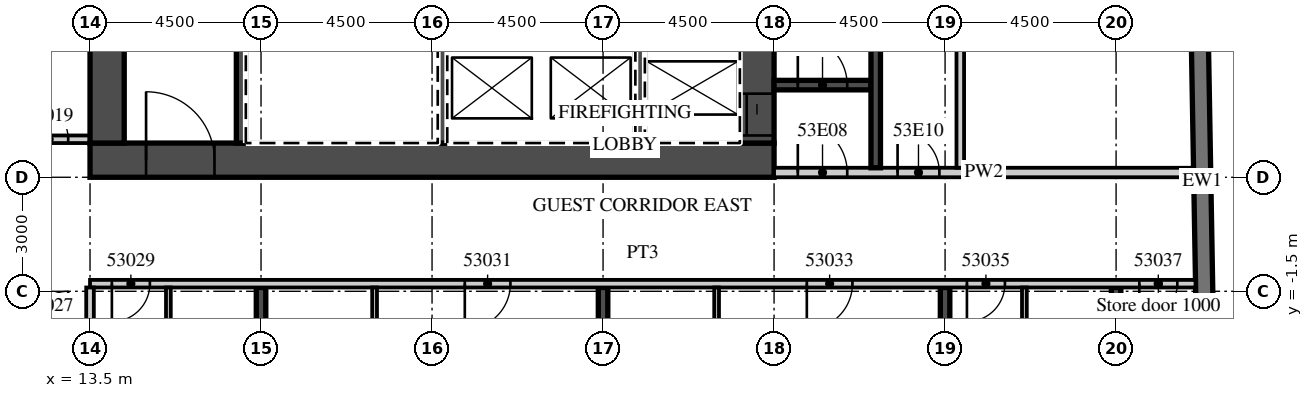
"""IFC4 building model, lengths in metres.
Left out: names, types, materials, properties, quantities, classifications, styles, units other than length and angle.
Written with IfcOpenShell. Run it as: python <this file> out.ifc"""

import sys

from ifc_helpers import new_model, si_unit, direction, frame, frame_2d, origin, place, context, subcontext, project, spatial, rectangle, extrude, element, fill, save


model = new_model("IFC4")
c1 = context("Model", 3, precision=1e-05, world=origin(), true_north=direction((0.0, 1.0)))
c2 = subcontext(c1, "Body", "Model", "MODEL_VIEW")
j1 = project(units=[si_unit("LENGTHUNIT", "METRE"), si_unit("PLANEANGLEUNIT", "RADIAN")], contexts=[c1])
p1 = place(None, origin())
s1 = spatial("IfcSite", under=j1, at=p1, CompositionType="ELEMENT")
p2 = place(p1, origin())
s2 = spatial("IfcBuilding", under=s1, at=p2, CompositionType="ELEMENT")
p3 = place(p2, frame((0.0, 0.0, 221.0)))
s3 = spatial("IfcBuildingStorey", under=s2, at=p3, CompositionType="ELEMENT", Elevation=221.0)
p4 = place(p3, frame((18.0, -19.079, 0.0), z_axis=(0.0, 0.0, 1.0), x_axis=(0.0, 1.0, 0.0)))
e1 = element("IfcWall", 1, at=p4, inside=s3, PredefinedType="SHEAR", context=c2, shape_type="SweptSolid", body=[
    extrude(rectangle(XDim=17.679, YDim=0.25, at=frame_2d((8.84, 0.0))), origin(), (0.0, 0.0, 1.0), 3.3),
])
p5 = place(p3, frame((27.0, -18.922, 0.0), z_axis=(0.0, 0.0, 1.0), x_axis=(0.0, 1.0, 0.0)))
e2 = element("IfcWall", 2, at=p5, inside=s3, PredefinedType="SHEAR", context=c2, shape_type="SweptSolid", body=[
    extrude(rectangle(XDim=17.522, YDim=0.25, at=frame_2d((8.761, 0.0))), origin(), (0.0, 0.0, 1.0), 3.3),
])
p6 = place(p3, frame((36.0, -18.765, 0.0), z_axis=(0.0, 0.0, 1.0), x_axis=(0.0, 1.0, 0.0)))
e3 = element("IfcWall", 3, at=p6, inside=s3, PredefinedType="SHEAR", context=c2, shape_type="SweptSolid", body=[
    extrude(rectangle(XDim=17.365, YDim=0.25, at=frame_2d((8.683, 0.0))), origin(), (0.0, 0.0, 1.0), 3.3),
])
p7 = place(p3, frame((40.5, -18.325, 0.0), z_axis=(0.0, 0.0, 1.0), x_axis=(0.0, 1.0, 0.0)))
e4 = element("IfcWall", 4, at=p7, inside=s3, PredefinedType="SHEAR", context=c2, shape_type="SweptSolid", body=[
    extrude(rectangle(XDim=16.925, YDim=0.25, at=frame_2d((8.463, 0.0))), origin(), (0.0, 0.0, 1.0), 3.3),
])
p8 = place(p3, frame((43.057, -15.103, 0.0), z_axis=(0.0, 0.0, 1.0), x_axis=(-0.017452408953, 0.999847695112, 0.0)))
e5 = element("IfcWall", 5, at=p8, inside=s3, PredefinedType="SOLIDWALL", context=c2, shape_type="SweptSolid", body=[
    extrude(rectangle(XDim=33.0, YDim=0.45, at=frame_2d((16.5, 0.0))), origin(), (0.0, 0.0, 1.0), 3.02),
])
p9 = place(p3, frame((-13.5, 2.5, 0.0), z_axis=(0.0, 0.0, 1.0), x_axis=(1.0, 0.0, 0.0)))
e6 = element("IfcWall", 6, at=p9, inside=s3, PredefinedType="PARTITIONING", context=c2, shape_type="SweptSolid", body=[
    extrude(rectangle(XDim=27.0, YDim=0.2, at=frame_2d((13.5, 0.0))), origin(), (0.0, 0.0, 1.0), 3.02),
])
p10 = place(p9, frame((2.925, 0.0, 0.0)))
e7 = element("IfcOpeningElement", 7, at=p10, cuts=e6, PredefinedType="OPENING", context=c2, shape_type="SweptSolid", body=[
    extrude(rectangle(XDim=1.0, YDim=2.1, at=frame_2d((0.5, 1.05))), frame((0.0, 0.11, 0.0), z_axis=(0.0, -1.0, 0.0), x_axis=(1.0, 0.0, 0.0)), (0.0, 0.0, 1.0), 0.22),
])
p11 = place(p9, frame((7.45, 0.0, 0.0)))
e8 = element("IfcOpeningElement", 8, at=p11, cuts=e6, PredefinedType="OPENING", context=c2, shape_type="SweptSolid", body=[
    extrude(rectangle(XDim=1.0, YDim=2.1, at=frame_2d((0.5, 1.05))), frame((0.0, 0.11, 0.0), z_axis=(0.0, -1.0, 0.0), x_axis=(1.0, 0.0, 0.0)), (0.0, 0.0, 1.0), 0.22),
])
p12 = place(p9, frame((11.925, 0.0, 0.0)))
e9 = element("IfcOpeningElement", 9, at=p12, cuts=e6, PredefinedType="OPENING", context=c2, shape_type="SweptSolid", body=[
    extrude(rectangle(XDim=1.0, YDim=2.1, at=frame_2d((0.5, 1.05))), frame((0.0, 0.11, 0.0), z_axis=(0.0, -1.0, 0.0), x_axis=(1.0, 0.0, 0.0)), (0.0, 0.0, 1.0), 0.22),
])
p13 = place(p9, frame((14.075, 0.0, 0.0)))
e10 = element("IfcOpeningElement", 10, at=p13, cuts=e6, PredefinedType="OPENING", context=c2, shape_type="SweptSolid", body=[
    extrude(rectangle(XDim=1.0, YDim=2.1, at=frame_2d((0.5, 1.05))), frame((0.0, 0.11, 0.0), z_axis=(0.0, -1.0, 0.0), x_axis=(1.0, 0.0, 0.0)), (0.0, 0.0, 1.0), 0.22),
])
p14 = place(p9, frame((20.925, 0.0, 0.0)))
e11 = element("IfcOpeningElement", 11, at=p14, cuts=e6, PredefinedType="OPENING", context=c2, shape_type="SweptSolid", body=[
    extrude(rectangle(XDim=1.0, YDim=2.1, at=frame_2d((0.5, 1.05))), frame((0.0, 0.11, 0.0), z_axis=(0.0, -1.0, 0.0), x_axis=(1.0, 0.0, 0.0)), (0.0, 0.0, 1.0), 0.22),
])
p15 = place(p9, frame((25.425, 0.0, 0.0)))
e12 = element("IfcOpeningElement", 12, at=p15, cuts=e6, PredefinedType="OPENING", context=c2, shape_type="SweptSolid", body=[
    extrude(rectangle(XDim=1.0, YDim=2.1, at=frame_2d((0.5, 1.05))), frame((0.0, 0.11, 0.0), z_axis=(0.0, -1.0, 0.0), x_axis=(1.0, 0.0, 0.0)), (0.0, 0.0, 1.0), 0.22),
])
p16 = place(p3, frame((13.5, -1.3, 0.0), z_axis=(0.0, 0.0, 1.0), x_axis=(1.0, 0.0, 0.0)))
e13 = element("IfcWall", 13, at=p16, inside=s3, PredefinedType="PARTITIONING", context=c2, shape_type="SweptSolid", body=[
    extrude(rectangle(XDim=29.091, YDim=0.2, at=frame_2d((14.545, 0.0))), origin(), (0.0, 0.0, 1.0), 3.02),
])
p17 = place(p16, frame((0.575, 0.0, 0.0)))
e14 = element("IfcOpeningElement", 14, at=p17, cuts=e13, PredefinedType="OPENING", context=c2, shape_type="SweptSolid", body=[
    extrude(rectangle(XDim=1.0, YDim=2.1, at=frame_2d((0.5, 1.05))), frame((0.0, 0.11, 0.0), z_axis=(0.0, -1.0, 0.0), x_axis=(1.0, 0.0, 0.0)), (0.0, 0.0, 1.0), 0.22),
])
p18 = place(p16, frame((9.862, 0.0, 0.0)))
e15 = element("IfcOpeningElement", 15, at=p18, cuts=e13, PredefinedType="OPENING", context=c2, shape_type="SweptSolid", body=[
    extrude(rectangle(XDim=1.2, YDim=2.1, at=frame_2d((0.6, 1.05))), frame((0.0, 0.11, 0.0), z_axis=(0.0, -1.0, 0.0), x_axis=(1.0, 0.0, 0.0)), (0.0, 0.0, 1.0), 0.22),
])
p19 = place(p16, frame((18.862, 0.0, 0.0)))
e16 = element("IfcOpeningElement", 16, at=p19, cuts=e13, PredefinedType="OPENING", context=c2, shape_type="SweptSolid", body=[
    extrude(rectangle(XDim=1.2, YDim=2.1, at=frame_2d((0.6, 1.05))), frame((0.0, 0.11, 0.0), z_axis=(0.0, -1.0, 0.0), x_axis=(1.0, 0.0, 0.0)), (0.0, 0.0, 1.0), 0.22),
])
p20 = place(p16, frame((23.075, 0.0, 0.0)))
e17 = element("IfcOpeningElement", 17, at=p20, cuts=e13, PredefinedType="OPENING", context=c2, shape_type="SweptSolid", body=[
    extrude(rectangle(XDim=1.0, YDim=2.1, at=frame_2d((0.5, 1.05))), frame((0.0, 0.11, 0.0), z_axis=(0.0, -1.0, 0.0), x_axis=(1.0, 0.0, 0.0)), (0.0, 0.0, 1.0), 0.22),
])
p21 = place(p16, frame((27.611, 0.0, 0.0)))
e18 = element("IfcOpeningElement", 18, at=p21, cuts=e13, PredefinedType="OPENING", context=c2, shape_type="SweptSolid", body=[
    extrude(rectangle(XDim=1.0, YDim=2.4, at=frame_2d((0.5, 1.2))), frame((0.0, 0.11, 0.0), z_axis=(0.0, -1.0, 0.0), x_axis=(1.0, 0.0, 0.0)), (0.0, 0.0, 1.0), 0.22),
])
p22 = place(p3, frame((13.5, -19.17, 0.0), z_axis=(0.0, 0.0, 1.0), x_axis=(0.0, 1.0, 0.0)))
e19 = element("IfcWall", 19, at=p22, inside=s3, PredefinedType="PARTITIONING", context=c2, shape_type="SweptSolid", body=[
    extrude(rectangle(XDim=17.77, YDim=0.2, at=frame_2d((8.885, 0.0))), origin(), (0.0, 0.0, 1.0), 3.02),
])
p23 = place(p3, frame((15.562, -8.125, 0.0), z_axis=(0.0, 0.0, 1.0), x_axis=(0.0, 1.0, 0.0)))
e20 = element("IfcWall", 20, at=p23, inside=s3, PredefinedType="PARTITIONING", context=c2, shape_type="SweptSolid", body=[
    extrude(rectangle(XDim=6.725, YDim=0.125, at=frame_2d((3.363, 0.0))), origin(), (0.0, 0.0, 1.0), 3.02),
])
p24 = place(p23, frame((3.375, 0.0, 0.0)))
e21 = element("IfcOpeningElement", 21, at=p24, cuts=e20, PredefinedType="OPENING", context=c2, shape_type="SweptSolid", body=[
    extrude(rectangle(XDim=0.9, YDim=2.1, at=frame_2d((0.45, 1.05))), frame((0.0, 0.073, 0.0), z_axis=(0.0, -1.0, 0.0), x_axis=(1.0, 0.0, 0.0)), (0.0, 0.0, 1.0), 0.145),
])
p25 = place(p3, frame((20.988, -8.125, 0.0), z_axis=(0.0, 0.0, 1.0), x_axis=(0.0, 1.0, 0.0)))
e22 = element("IfcWall", 22, at=p25, inside=s3, PredefinedType="PARTITIONING", context=c2, shape_type="SweptSolid", body=[
    extrude(rectangle(XDim=6.725, YDim=0.125, at=frame_2d((3.363, 0.0))), origin(), (0.0, 0.0, 1.0), 3.02),
])
p26 = place(p25, frame((3.375, 0.0, 0.0)))
e23 = element("IfcOpeningElement", 23, at=p26, cuts=e22, PredefinedType="OPENING", context=c2, shape_type="SweptSolid", body=[
    extrude(rectangle(XDim=0.9, YDim=2.1, at=frame_2d((0.45, 1.05))), frame((0.0, 0.073, 0.0), z_axis=(0.0, -1.0, 0.0), x_axis=(1.0, 0.0, 0.0)), (0.0, 0.0, 1.0), 0.145),
])
p27 = place(p3, frame((29.988, -8.125, 0.0), z_axis=(0.0, 0.0, 1.0), x_axis=(0.0, 1.0, 0.0)))
e24 = element("IfcWall", 24, at=p27, inside=s3, PredefinedType="PARTITIONING", context=c2, shape_type="SweptSolid", body=[
    extrude(rectangle(XDim=6.725, YDim=0.125, at=frame_2d((3.363, 0.0))), origin(), (0.0, 0.0, 1.0), 3.02),
])
p28 = place(p27, frame((3.375, 0.0, 0.0)))
e25 = element("IfcOpeningElement", 25, at=p28, cuts=e24, PredefinedType="OPENING", context=c2, shape_type="SweptSolid", body=[
    extrude(rectangle(XDim=0.9, YDim=2.1, at=frame_2d((0.45, 1.05))), frame((0.0, 0.073, 0.0), z_axis=(0.0, -1.0, 0.0), x_axis=(1.0, 0.0, 0.0)), (0.0, 0.0, 1.0), 0.145),
])
p29 = place(p3, frame((38.087, -8.125, 0.0), z_axis=(0.0, 0.0, 1.0), x_axis=(0.0, 1.0, 0.0)))
e26 = element("IfcWall", 26, at=p29, inside=s3, PredefinedType="PARTITIONING", context=c2, shape_type="SweptSolid", body=[
    extrude(rectangle(XDim=6.725, YDim=0.125, at=frame_2d((3.363, 0.0))), origin(), (0.0, 0.0, 1.0), 3.02),
])
p30 = place(p29, frame((3.375, 0.0, 0.0)))
e27 = element("IfcOpeningElement", 27, at=p30, cuts=e26, PredefinedType="OPENING", context=c2, shape_type="SweptSolid", body=[
    extrude(rectangle(XDim=0.9, YDim=2.1, at=frame_2d((0.45, 1.05))), frame((0.0, 0.073, 0.0), z_axis=(0.0, -1.0, 0.0), x_axis=(1.0, 0.0, 0.0)), (0.0, 0.0, 1.0), 0.145),
])
p31 = place(p3, frame((13.5, 1.95, 0.0), z_axis=(0.0, 0.0, 1.0), x_axis=(1.0, 0.0, 0.0)))
e28 = element("IfcWall", 28, at=p31, inside=s3, PredefinedType="SHEAR", context=c2, shape_type="SweptSolid", body=[
    extrude(rectangle(XDim=18.0, YDim=0.9, at=frame_2d((9.0, 0.0))), origin(), (0.0, 0.0, 1.0), 3.02),
])
p32 = place(p31, frame((1.475, 0.0, 0.0)))
e29 = element("IfcOpeningElement", 29, at=p32, cuts=e28, PredefinedType="OPENING", context=c2, shape_type="SweptSolid", body=[
    extrude(rectangle(XDim=1.8, YDim=2.1, at=frame_2d((0.9, 1.05))), frame((0.0, 0.46, 0.0), z_axis=(0.0, -1.0, 0.0), x_axis=(1.0, 0.0, 0.0)), (0.0, 0.0, 1.0), 0.92),
])
p33 = place(p3, frame((31.05, 2.4, 0.0), z_axis=(0.0, 0.0, 1.0), x_axis=(0.0, 1.0, 0.0)))
e30 = element("IfcWall", 30, at=p33, inside=s3, PredefinedType="SHEAR", context=c2, shape_type="SweptSolid", body=[
    extrude(rectangle(XDim=12.8, YDim=0.9, at=frame_2d((6.4, 0.0))), origin(), (0.0, 0.0, 1.0), 3.02),
])
p34 = place(p33, frame((0.2, 0.0, 0.0)))
e31 = element("IfcOpeningElement", 31, at=p34, cuts=e30, PredefinedType="OPENING", context=c2, shape_type="SweptSolid", body=[
    extrude(rectangle(XDim=1.1, YDim=2.1, at=frame_2d((0.55, 1.05))), frame((0.0, 0.46, 0.0), z_axis=(0.0, -1.0, 0.0), x_axis=(1.0, 0.0, 0.0)), (0.0, 0.0, 1.0), 0.92),
])
p35 = place(p3, frame((13.95, 2.4, 0.0), z_axis=(0.0, 0.0, 1.0), x_axis=(0.0, 1.0, 0.0)))
e32 = element("IfcWall", 32, at=p35, inside=s3, PredefinedType="SHEAR", context=c2, shape_type="SweptSolid", body=[
    extrude(rectangle(XDim=12.2, YDim=0.9, at=frame_2d((6.1, 0.0))), origin(), (0.0, 0.0, 1.0), 3.02),
])
p36 = place(p3, frame((17.475, 2.4, 0.0), z_axis=(0.0, 0.0, 1.0), x_axis=(0.0, 1.0, 0.0)))
e33 = element("IfcWall", 33, at=p36, inside=s3, PredefinedType="SHEAR", context=c2, shape_type="SweptSolid", body=[
    extrude(rectangle(XDim=3.15, YDim=0.25, at=frame_2d((1.575, 0.0))), origin(), (0.0, 0.0, 1.0), 3.02),
])
for number, where, z_axis, x_axis in (
    (34, (27.975, 2.4, 0.0), (0.0, 0.0, 1.0), (0.0, 1.0, 0.0)),
    (35, (22.775, 2.4, 0.0), (0.0, 0.0, 1.0), (0.0, 1.0, 0.0)),
):
    element("IfcWall", number, at=place(p3, frame(where, z_axis=z_axis, x_axis=x_axis)), inside=s3, PredefinedType="SHEAR", context=c2, shape_type="SweptSolid", body=[
        extrude(rectangle(XDim=2.9, YDim=0.25, at=frame_2d((1.45, 0.0))), origin(), (0.0, 0.0, 1.0), 3.02),
    ])
p37 = place(p3, frame((31.5, 1.625, 0.0), z_axis=(0.0, 0.0, 1.0), x_axis=(1.0, 0.0, 0.0)))
e36 = element("IfcWall", 36, at=p37, inside=s3, PredefinedType="PARTITIONING", context=c2, shape_type="SweptSolid", body=[
    extrude(rectangle(XDim=11.04, YDim=0.25, at=frame_2d((5.52, 0.0))), origin(), (0.0, 0.0, 1.0), 3.02),
])
p38 = place(p37, frame((0.625, 0.0, 0.0)))
e37 = element("IfcOpeningElement", 37, at=p38, cuts=e36, PredefinedType="OPENING", context=c2, shape_type="SweptSolid", body=[
    extrude(rectangle(XDim=1.3, YDim=2.1, at=frame_2d((0.65, 1.05))), frame((0.0, 0.135, 0.0), z_axis=(0.0, -1.0, 0.0), x_axis=(1.0, 0.0, 0.0)), (0.0, 0.0, 1.0), 0.27),
])
p39 = place(p37, frame((3.25, 0.0, 0.0)))
e38 = element("IfcOpeningElement", 38, at=p39, cuts=e36, PredefinedType="OPENING", context=c2, shape_type="SweptSolid", body=[
    extrude(rectangle(XDim=1.1, YDim=2.1, at=frame_2d((0.55, 1.05))), frame((0.0, 0.135, 0.0), z_axis=(0.0, -1.0, 0.0), x_axis=(1.0, 0.0, 0.0)), (0.0, 0.0, 1.0), 0.27),
])
p40 = place(p3, frame((31.5, 3.925, 0.0), z_axis=(0.0, 0.0, 1.0), x_axis=(1.0, 0.0, 0.0)))
e39 = element("IfcWall", 39, at=p40, inside=s3, PredefinedType="SHEAR", context=c2, shape_type="SweptSolid", body=[
    extrude(rectangle(XDim=2.55, YDim=0.25, at=frame_2d((1.275, 0.0))), origin(), (0.0, 0.0, 1.0), 3.02),
])
p41 = place(p40, frame((0.625, 0.0, 0.0)))
e40 = element("IfcOpeningElement", 40, at=p41, cuts=e39, PredefinedType="OPENING", context=c2, shape_type="SweptSolid", body=[
    extrude(rectangle(XDim=1.3, YDim=2.1, at=frame_2d((0.65, 1.05))), frame((0.0, 0.135, 0.0), z_axis=(0.0, -1.0, 0.0), x_axis=(1.0, 0.0, 0.0)), (0.0, 0.0, 1.0), 0.27),
])
p42 = place(p3, frame((34.175, 1.75, 0.0), z_axis=(0.0, 0.0, 1.0), x_axis=(0.0, 1.0, 0.0)))
e41 = element("IfcWall", 41, at=p42, inside=s3, PredefinedType="SHEAR", context=c2, shape_type="SweptSolid", body=[
    extrude(rectangle(XDim=8.35, YDim=0.25, at=frame_2d((4.175, 0.0))), origin(), (0.0, 0.0, 1.0), 3.02),
])
p43 = place(p3, frame((36.4, 1.75, 0.0), z_axis=(0.0, 0.0, 1.0), x_axis=(0.0, 1.0, 0.0)))
e42 = element("IfcWall", 42, at=p43, inside=s3, PredefinedType="PARTITIONING", context=c2, shape_type="SweptSolid", body=[
    extrude(rectangle(XDim=15.95, YDim=0.2, at=frame_2d((7.975, 0.0))), origin(), (0.0, 0.0, 1.0), 3.02),
])
p44 = place(p43, frame((14.7, 0.0, 0.0)))
e43 = element("IfcOpeningElement", 43, at=p44, cuts=e42, PredefinedType="OPENING", context=c2, shape_type="SweptSolid", body=[
    extrude(rectangle(XDim=0.9, YDim=2.1, at=frame_2d((0.45, 1.05))), frame((0.0, 0.11, 0.0), z_axis=(0.0, -1.0, 0.0), x_axis=(1.0, 0.0, 0.0)), (0.0, 0.0, 1.0), 0.22),
])
p45 = place(p15, origin())
e44 = element("IfcDoor", 44, at=p45, inside=s3, OperationType="SINGLE_SWING_LEFT", PredefinedType="DOOR", context=c2, shape_type="SweptSolid", body=[
    extrude(rectangle(XDim=1.0, YDim=2.1, at=frame_2d((0.5, 1.05))), frame((0.0, 0.025, 0.0), z_axis=(0.0, -1.0, 0.0), x_axis=(1.0, 0.0, 0.0)), (0.0, 0.0, 1.0), 0.05),
])
fill(e12, e44)
p46 = place(p17, origin())
e45 = element("IfcDoor", 45, at=p46, inside=s3, OperationType="SINGLE_SWING_LEFT", PredefinedType="DOOR", context=c2, shape_type="SweptSolid", body=[
    extrude(rectangle(XDim=1.0, YDim=2.1, at=frame_2d((0.5, 1.05))), frame((0.0, 0.025, 0.0), z_axis=(0.0, -1.0, 0.0), x_axis=(1.0, 0.0, 0.0)), (0.0, 0.0, 1.0), 0.05),
])
fill(e14, e45)
p47 = place(p18, origin())
e46 = element("IfcDoor", 46, at=p47, inside=s3, OperationType="SINGLE_SWING_LEFT", PredefinedType="DOOR", context=c2, shape_type="SweptSolid", body=[
    extrude(rectangle(XDim=1.2, YDim=2.1, at=frame_2d((0.6, 1.05))), frame((0.0, 0.025, 0.0), z_axis=(0.0, -1.0, 0.0), x_axis=(1.0, 0.0, 0.0)), (0.0, 0.0, 1.0), 0.05),
])
fill(e15, e46)
p48 = place(p19, origin())
e47 = element("IfcDoor", 47, at=p48, inside=s3, OperationType="SINGLE_SWING_LEFT", PredefinedType="DOOR", context=c2, shape_type="SweptSolid", body=[
    extrude(rectangle(XDim=1.2, YDim=2.1, at=frame_2d((0.6, 1.05))), frame((0.0, 0.025, 0.0), z_axis=(0.0, -1.0, 0.0), x_axis=(1.0, 0.0, 0.0)), (0.0, 0.0, 1.0), 0.05),
])
fill(e16, e47)
p49 = place(p20, origin())
e48 = element("IfcDoor", 48, at=p49, inside=s3, OperationType="SINGLE_SWING_LEFT", PredefinedType="DOOR", context=c2, shape_type="SweptSolid", body=[
    extrude(rectangle(XDim=1.0, YDim=2.1, at=frame_2d((0.5, 1.05))), frame((0.0, 0.025, 0.0), z_axis=(0.0, -1.0, 0.0), x_axis=(1.0, 0.0, 0.0)), (0.0, 0.0, 1.0), 0.05),
])
fill(e17, e48)
p50 = place(p21, origin())
e49 = element("IfcDoor", 49, at=p50, inside=s3, OperationType="SINGLE_SWING_LEFT", PredefinedType="DOOR", context=c2, shape_type="SweptSolid", body=[
    extrude(rectangle(XDim=1.0, YDim=2.4, at=frame_2d((0.5, 1.2))), frame((0.0, 0.025, 0.0), z_axis=(0.0, -1.0, 0.0), x_axis=(1.0, 0.0, 0.0)), (0.0, 0.0, 1.0), 0.05),
])
fill(e18, e49)
p51 = place(p34, origin())
e50 = element("IfcDoor", 50, at=p51, inside=s3, OperationType="SLIDING_TO_LEFT", PredefinedType="DOOR", context=c2, shape_type="SweptSolid", body=[
    extrude(rectangle(XDim=1.1, YDim=2.1, at=frame_2d((0.55, 1.05))), frame((0.0, 0.025, 0.0), z_axis=(0.0, -1.0, 0.0), x_axis=(1.0, 0.0, 0.0)), (0.0, 0.0, 1.0), 0.05),
])
fill(e31, e50)
p52 = place(p32, origin())
e51 = element("IfcDoor", 51, at=p52, inside=s3, OperationType="DOUBLE_DOOR_DOUBLE_SWING", PredefinedType="DOOR", context=c2, shape_type="SweptSolid", body=[
    extrude(rectangle(XDim=1.8, YDim=2.1, at=frame_2d((0.9, 1.05))), frame((0.0, 0.025, 0.0), z_axis=(0.0, -1.0, 0.0), x_axis=(1.0, 0.0, 0.0)), (0.0, 0.0, 1.0), 0.05),
])
fill(e29, e51)
p53 = place(p38, origin())
e52 = element("IfcDoor", 52, at=p53, inside=s3, OperationType="SINGLE_SWING_LEFT", PredefinedType="DOOR", context=c2, shape_type="SweptSolid", body=[
    extrude(rectangle(XDim=1.3, YDim=2.1, at=frame_2d((0.65, 1.05))), frame((0.0, 0.025, 0.0), z_axis=(0.0, -1.0, 0.0), x_axis=(1.0, 0.0, 0.0)), (0.0, 0.0, 1.0), 0.05),
])
fill(e37, e52)
p54 = place(p41, origin())
e53 = element("IfcDoor", 53, at=p54, inside=s3, OperationType="SINGLE_SWING_LEFT", PredefinedType="DOOR", context=c2, shape_type="SweptSolid", body=[
    extrude(rectangle(XDim=1.3, YDim=2.1, at=frame_2d((0.65, 1.05))), frame((0.0, 0.025, 0.0), z_axis=(0.0, -1.0, 0.0), x_axis=(1.0, 0.0, 0.0)), (0.0, 0.0, 1.0), 0.05),
])
fill(e40, e53)
p55 = place(p39, origin())
e54 = element("IfcDoor", 54, at=p55, inside=s3, OperationType="SINGLE_SWING_LEFT", PredefinedType="DOOR", context=c2, shape_type="SweptSolid", body=[
    extrude(rectangle(XDim=1.1, YDim=2.1, at=frame_2d((0.55, 1.05))), frame((0.0, 0.025, 0.0), z_axis=(0.0, -1.0, 0.0), x_axis=(1.0, 0.0, 0.0)), (0.0, 0.0, 1.0), 0.05),
])
fill(e38, e54)
save(model, sys.argv[1])
